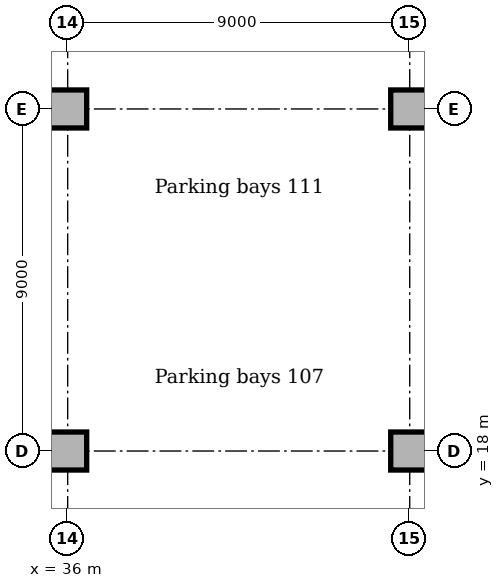
"""IFC4 building model, lengths in metres.
Left out: names, types, materials, properties, quantities, classifications, styles, units other than length and angle.
Written with IfcOpenShell. Run it as: python <this file> out.ifc"""

import sys

from ifc_helpers import new_model, si_unit, direction, frame, origin, origin_2d, place, context, subcontext, project, spatial, rectangle, extrude, element, save


model = new_model("IFC4")
c1 = context("Model", 3, precision=1e-05, world=origin(), true_north=direction((0.0, 1.0)))
c2 = subcontext(c1, "Body", "Model", "MODEL_VIEW")
j1 = project(units=[si_unit("LENGTHUNIT", "METRE"), si_unit("PLANEANGLEUNIT", "RADIAN")], contexts=[c1])
p1 = place(None, origin())
s1 = spatial("IfcSite", under=j1, at=p1, CompositionType="ELEMENT")
p2 = place(p1, origin())
s2 = spatial("IfcBuilding", under=s1, at=p2, CompositionType="ELEMENT")
p3 = place(p2, frame((0.0, 0.0, -5.0)))
s3 = spatial("IfcBuildingStorey", under=s2, at=p3, CompositionType="ELEMENT", Elevation=-5.0)
for number, where, z_axis, x_axis in (
    (1, (36.0, 18.0, 0.0), (0.0, 0.0, 1.0), (1.0, 0.0, 0.0)),
    (2, (36.0, 27.0, 0.0), (0.0, 0.0, 1.0), (1.0, 0.0, 0.0)),
    (3, (45.0, 18.0, 0.0), (0.0, 0.0, 1.0), (1.0, 0.0, 0.0)),
    (4, (45.0, 27.0, 0.0), (0.0, 0.0, 1.0), (1.0, 0.0, 0.0)),
):
    element("IfcColumn", number, at=place(p3, frame(where, z_axis=z_axis, x_axis=x_axis)), inside=s3, PredefinedType="COLUMN", context=c2, shape_type="SweptSolid", body=[
        extrude(rectangle(XDim=1.0, YDim=1.0, at=origin_2d()), origin(), (0.0, 0.0, 1.0), 4.7),
    ])
save(model, sys.argv[1])
